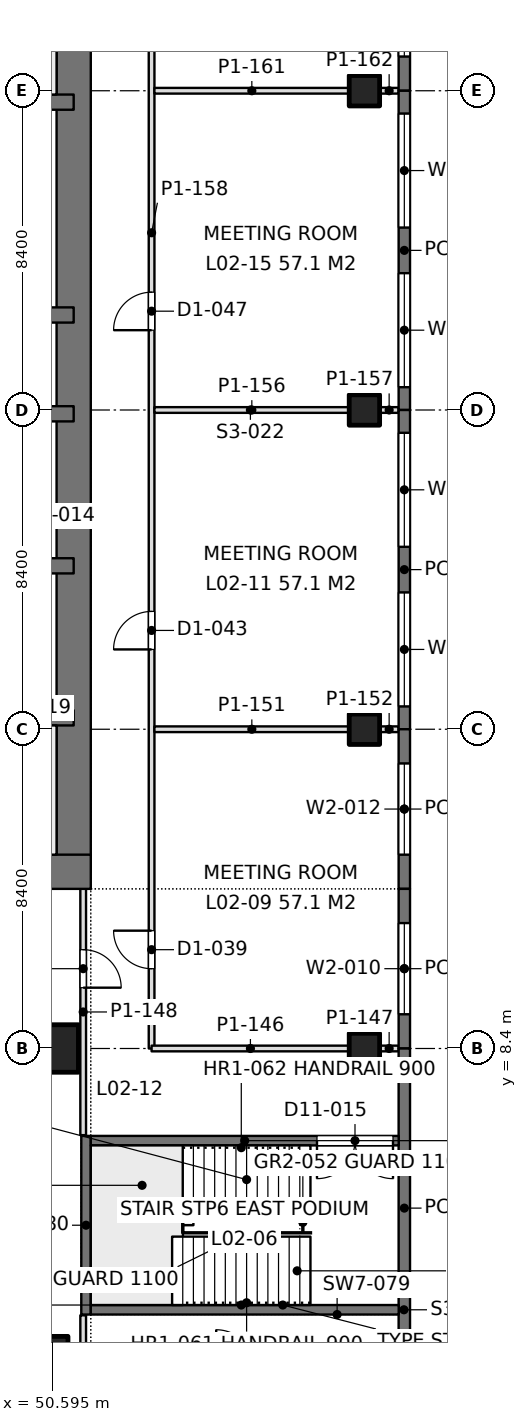
"""IFC4 building model, lengths in metres.
Left out: names, types, materials, properties, quantities, classifications, styles, units other than length and angle.
Written with IfcOpenShell. Run it as: python <this file> out.ifc"""

import sys

from ifc_helpers import new_model, si_unit, direction, frame, frame_2d, origin, origin_2d, place, context, subcontext, project, spatial, rectangle, extrude, element, fill, save


model = new_model("IFC4")
c1 = context("Model", 3, precision=1e-05, world=origin(), true_north=direction((0.0, 1.0)))
c2 = subcontext(c1, "Body", "Model", "MODEL_VIEW")
j1 = project(units=[si_unit("LENGTHUNIT", "METRE"), si_unit("PLANEANGLEUNIT", "RADIAN")], contexts=[c1])
p1 = place(None, origin())
s1 = spatial("IfcSite", under=j1, at=p1, CompositionType="ELEMENT")
p2 = place(p1, origin())
s2 = spatial("IfcBuilding", under=s1, at=p2, CompositionType="ELEMENT")
p3 = place(p2, frame((0.0, 0.0, 9.9)))
s3 = spatial("IfcBuildingStorey", under=s2, at=p3, CompositionType="ELEMENT", Elevation=9.9)
p4 = place(p3, frame((50.4, 0.0, 0.0), z_axis=(0.0, 0.0, 1.0), x_axis=(1.0, 0.0, 0.0)))
e1 = element("IfcColumn", 1, at=p4, inside=s3, PredefinedType="COLUMN", context=c2, shape_type="SweptSolid", body=[
    extrude(rectangle(XDim=1.2, YDim=1.65, at=origin_2d()), origin(), (0.0, 0.0, 1.0), 4.5),
])
p5 = place(p3, frame((50.4, 8.4, 0.0), z_axis=(0.0, 0.0, 1.0), x_axis=(0.0, 1.0, 0.0)))
e2 = element("IfcColumn", 2, at=p5, inside=s3, PredefinedType="COLUMN", context=c2, shape_type="SweptSolid", body=[
    extrude(rectangle(XDim=1.25, YDim=1.75, at=origin_2d()), origin(), (0.0, 0.0, 1.0), 4.5),
])
for number, where, z_axis, x_axis in (
    (3, (58.8, 8.4, 0.0), (0.0, 0.0, 1.0), (1.0, 0.0, 0.0)),
    (4, (58.8, 16.8, 0.0), (0.0, 0.0, 1.0), (1.0, 0.0, 0.0)),
    (5, (58.8, 25.2, 0.0), (0.0, 0.0, 1.0), (1.0, 0.0, 0.0)),
    (6, (58.8, 33.6, 0.0), (0.0, 0.0, 1.0), (1.0, 0.0, 0.0)),
):
    element("IfcColumn", number, at=place(p3, frame(where, z_axis=z_axis, x_axis=x_axis)), inside=s3, PredefinedType="COLUMN", context=c2, shape_type="SweptSolid", body=[
        extrude(rectangle(XDim=0.8, YDim=0.8, at=origin_2d()), origin(), (0.0, 0.0, 1.0), 4.5),
    ])
p6 = place(p3, frame((33.6, 13.05, 0.0), z_axis=(0.0, 0.0, 1.0), x_axis=(1.0, 0.0, 0.0)))
e7 = element("IfcWall", 7, at=p6, inside=s3, PredefinedType="SHEAR", context=c2, shape_type="SweptSolid", body=[
    extrude(rectangle(XDim=18.0, YDim=0.9, at=frame_2d((9.0, 0.0))), origin(), (0.0, 0.0, 1.0), 4.5),
])
p7 = place(p6, frame((7.25, 0.0, 0.0)))
e8 = element("IfcOpeningElement", 8, at=p7, cuts=e7, PredefinedType="OPENING", context=c2, shape_type="SweptSolid", body=[
    extrude(rectangle(XDim=1.8, YDim=2.4, at=frame_2d((0.9, 1.2))), frame((0.0, 0.46, 0.0), z_axis=(0.0, -1.0, 0.0), x_axis=(1.0, 0.0, 0.0)), (0.0, 0.0, 1.0), 0.92),
])
p8 = place(p3, frame((51.15, 13.05, 0.0), z_axis=(0.0, 0.0, 1.0), x_axis=(0.0, 1.0, 0.0)))
e9 = element("IfcWall", 9, at=p8, inside=s3, PredefinedType="SHEAR", context=c2, shape_type="SweptSolid", body=[
    extrude(rectangle(XDim=24.3, YDim=0.9, at=frame_2d((12.15, 0.0))), origin(), (0.0, 0.0, 1.0), 4.5),
])
for number, where, z_axis, x_axis in (
    (10, (51.15, 17.1, 0.0), (0.0, 0.0, 1.0), (-1.0, 0.0, 0.0)),
    (11, (51.15, 21.1, 0.0), (0.0, 0.0, 1.0), (-1.0, 0.0, 0.0)),
    (12, (51.15, 25.1, 0.0), (0.0, 0.0, 1.0), (-1.0, 0.0, 0.0)),
    (13, (51.15, 27.7, 0.0), (0.0, 0.0, 1.0), (-1.0, 0.0, 0.0)),
    (14, (51.15, 33.3, 0.0), (0.0, 0.0, 1.0), (-1.0, 0.0, 0.0)),
):
    element("IfcWall", number, at=place(p3, frame(where, z_axis=z_axis, x_axis=x_axis)), inside=s3, PredefinedType="SHEAR", context=c2, shape_type="SweptSolid", body=[
        extrude(rectangle(XDim=7.65, YDim=0.4, at=frame_2d((3.825, 0.0))), origin(), (0.0, 0.0, 1.0), 4.5),
    ])
p9 = place(p3, frame((59.85, 37.8, 0.0), z_axis=(0.0, 0.0, 1.0), x_axis=(0.0, -1.0, 0.0)))
e15 = element("IfcWall", 15, at=p9, inside=s3, PredefinedType="SOLIDWALL", context=c2, shape_type="SweptSolid", body=[
    extrude(rectangle(XDim=4.2, YDim=0.3, at=frame_2d((2.1, 0.0))), origin(), (0.0, 0.0, 1.0), 4.3),
])
p10 = place(p9, frame((0.9, 0.0, 0.9)))
e16 = element("IfcOpeningElement", 16, at=p10, cuts=e15, PredefinedType="OPENING", context=c2, shape_type="SweptSolid", body=[
    extrude(rectangle(XDim=2.4, YDim=1.9, at=frame_2d((1.2, 0.95))), frame((0.0, 0.16, 0.0), z_axis=(0.0, -1.0, 0.0), x_axis=(1.0, 0.0, 0.0)), (0.0, 0.0, 1.0), 0.32),
])
p11 = place(p3, frame((59.85, 33.6, 0.0), z_axis=(0.0, 0.0, 1.0), x_axis=(0.0, -1.0, 0.0)))
e17 = element("IfcWall", 17, at=p11, inside=s3, PredefinedType="SOLIDWALL", context=c2, shape_type="SweptSolid", body=[
    extrude(rectangle(XDim=8.4, YDim=0.3, at=frame_2d((4.2, 0.0))), origin(), (0.0, 0.0, 1.0), 4.3),
])
p12 = place(p11, frame((0.6, 0.0, 0.9)))
e18 = element("IfcOpeningElement", 18, at=p12, cuts=e17, PredefinedType="OPENING", context=c2, shape_type="SweptSolid", body=[
    extrude(rectangle(XDim=3.0, YDim=2.4, at=frame_2d((1.5, 1.2))), frame((0.0, 0.16, 0.0), z_axis=(0.0, -1.0, 0.0), x_axis=(1.0, 0.0, 0.0)), (0.0, 0.0, 1.0), 0.32),
])
p13 = place(p11, frame((4.8, 0.0, 0.9)))
e19 = element("IfcOpeningElement", 19, at=p13, cuts=e17, PredefinedType="OPENING", context=c2, shape_type="SweptSolid", body=[
    extrude(rectangle(XDim=3.0, YDim=2.4, at=frame_2d((1.5, 1.2))), frame((0.0, 0.16, 0.0), z_axis=(0.0, -1.0, 0.0), x_axis=(1.0, 0.0, 0.0)), (0.0, 0.0, 1.0), 0.32),
])
p14 = place(p3, frame((59.85, 25.2, 0.0), z_axis=(0.0, 0.0, 1.0), x_axis=(0.0, -1.0, 0.0)))
e20 = element("IfcWall", 20, at=p14, inside=s3, PredefinedType="SOLIDWALL", context=c2, shape_type="SweptSolid", body=[
    extrude(rectangle(XDim=8.4, YDim=0.3, at=frame_2d((4.2, 0.0))), origin(), (0.0, 0.0, 1.0), 4.3),
])
p15 = place(p14, frame((0.6, 0.0, 0.9)))
e21 = element("IfcOpeningElement", 21, at=p15, cuts=e20, PredefinedType="OPENING", context=c2, shape_type="SweptSolid", body=[
    extrude(rectangle(XDim=3.0, YDim=2.4, at=frame_2d((1.5, 1.2))), frame((0.0, 0.16, 0.0), z_axis=(0.0, -1.0, 0.0), x_axis=(1.0, 0.0, 0.0)), (0.0, 0.0, 1.0), 0.32),
])
p16 = place(p14, frame((4.8, 0.0, 0.9)))
e22 = element("IfcOpeningElement", 22, at=p16, cuts=e20, PredefinedType="OPENING", context=c2, shape_type="SweptSolid", body=[
    extrude(rectangle(XDim=3.0, YDim=2.4, at=frame_2d((1.5, 1.2))), frame((0.0, 0.16, 0.0), z_axis=(0.0, -1.0, 0.0), x_axis=(1.0, 0.0, 0.0)), (0.0, 0.0, 1.0), 0.32),
])
p17 = place(p3, frame((59.85, 16.8, 0.0), z_axis=(0.0, 0.0, 1.0), x_axis=(0.0, -1.0, 0.0)))
e23 = element("IfcWall", 23, at=p17, inside=s3, PredefinedType="SOLIDWALL", context=c2, shape_type="SweptSolid", body=[
    extrude(rectangle(XDim=4.2, YDim=0.3, at=frame_2d((2.1, 0.0))), origin(), (0.0, 0.0, 1.0), 4.3),
])
p18 = place(p17, frame((0.9, 0.0, 0.9)))
e24 = element("IfcOpeningElement", 24, at=p18, cuts=e23, PredefinedType="OPENING", context=c2, shape_type="SweptSolid", body=[
    extrude(rectangle(XDim=2.4, YDim=1.9, at=frame_2d((1.2, 0.95))), frame((0.0, 0.16, 0.0), z_axis=(0.0, -1.0, 0.0), x_axis=(1.0, 0.0, 0.0)), (0.0, 0.0, 1.0), 0.32),
])
p19 = place(p3, frame((59.85, 12.6, 0.0), z_axis=(0.0, 0.0, 1.0), x_axis=(0.0, -1.0, 0.0)))
e25 = element("IfcWall", 25, at=p19, inside=s3, PredefinedType="SOLIDWALL", context=c2, shape_type="SweptSolid", body=[
    extrude(rectangle(XDim=4.2, YDim=0.3, at=frame_2d((2.1, 0.0))), origin(), (0.0, 0.0, 1.0), 4.3),
])
p20 = place(p19, frame((0.9, 0.0, 0.9)))
e26 = element("IfcOpeningElement", 26, at=p20, cuts=e25, PredefinedType="OPENING", context=c2, shape_type="SweptSolid", body=[
    extrude(rectangle(XDim=2.4, YDim=1.9, at=frame_2d((1.2, 0.95))), frame((0.0, 0.16, 0.0), z_axis=(0.0, -1.0, 0.0), x_axis=(1.0, 0.0, 0.0)), (0.0, 0.0, 1.0), 0.32),
])
p21 = place(p3, frame((59.85, 8.4, 0.0), z_axis=(0.0, 0.0, 1.0), x_axis=(0.0, -1.0, 0.0)))
e27 = element("IfcWall", 27, at=p21, inside=s3, PredefinedType="SOLIDWALL", context=c2, shape_type="SweptSolid", body=[
    extrude(rectangle(XDim=8.4, YDim=0.3, at=frame_2d((4.2, 0.0))), origin(), (0.0, 0.0, 1.0), 4.3),
])
p22 = place(p3, frame((51.4, -1.0, 0.0), z_axis=(0.0, 0.0, 1.0), x_axis=(0.0, 1.0, 0.0)))
e28 = element("IfcWall", 28, at=p22, inside=s3, PredefinedType="PARTITIONING", context=c2, shape_type="SweptSolid", body=[
    extrude(rectangle(XDim=2.38, YDim=0.15, at=frame_2d((1.19, 0.0))), origin(), (0.0, 0.0, 1.0), 3.65),
])
p23 = place(p3, frame((51.4, 6.12, 0.0), z_axis=(0.0, 0.0, 1.0), x_axis=(0.0, 1.0, 0.0)))
e29 = element("IfcWall", 29, at=p23, inside=s3, PredefinedType="PARTITIONING", context=c2, shape_type="SweptSolid", body=[
    extrude(rectangle(XDim=6.482, YDim=0.15, at=frame_2d((3.241, 0.0))), origin(), (0.0, 0.0, 1.0), 3.65),
])
p24 = place(p23, frame((3.88, 0.0, 0.0)))
e30 = element("IfcOpeningElement", 30, at=p24, cuts=e29, PredefinedType="OPENING", context=c2, shape_type="SweptSolid", body=[
    extrude(rectangle(XDim=1.0, YDim=2.2, at=frame_2d((0.5, 1.1))), frame((0.0, 0.085, 0.0), z_axis=(0.0, -1.0, 0.0), x_axis=(1.0, 0.0, 0.0)), (0.0, 0.0, 1.0), 0.17),
])
p25 = place(p3, frame((53.2, 8.4, 0.0), z_axis=(0.0, 0.0, 1.0), x_axis=(0.0, 1.0, 0.0)))
e31 = element("IfcWall", 31, at=p25, inside=s3, PredefinedType="PARTITIONING", context=c2, shape_type="SweptSolid", body=[
    extrude(rectangle(XDim=42.926, YDim=0.15, at=frame_2d((21.463, 0.0))), origin(), (0.0, 0.0, 1.0), 3.65),
])
p26 = place(p25, frame((2.1, 0.0, 0.0)))
e32 = element("IfcOpeningElement", 32, at=p26, cuts=e31, PredefinedType="OPENING", context=c2, shape_type="SweptSolid", body=[
    extrude(rectangle(XDim=1.0, YDim=2.2, at=frame_2d((0.5, 1.1))), frame((0.0, 0.085, 0.0), z_axis=(0.0, -1.0, 0.0), x_axis=(1.0, 0.0, 0.0)), (0.0, 0.0, 1.0), 0.17),
])
p27 = place(p25, frame((10.5, 0.0, 0.0)))
e33 = element("IfcOpeningElement", 33, at=p27, cuts=e31, PredefinedType="OPENING", context=c2, shape_type="SweptSolid", body=[
    extrude(rectangle(XDim=1.0, YDim=2.2, at=frame_2d((0.5, 1.1))), frame((0.0, 0.085, 0.0), z_axis=(0.0, -1.0, 0.0), x_axis=(1.0, 0.0, 0.0)), (0.0, 0.0, 1.0), 0.17),
])
p28 = place(p25, frame((18.9, 0.0, 0.0)))
e34 = element("IfcOpeningElement", 34, at=p28, cuts=e31, PredefinedType="OPENING", context=c2, shape_type="SweptSolid", body=[
    extrude(rectangle(XDim=1.0, YDim=2.2, at=frame_2d((0.5, 1.1))), frame((0.0, 0.085, 0.0), z_axis=(0.0, -1.0, 0.0), x_axis=(1.0, 0.0, 0.0)), (0.0, 0.0, 1.0), 0.17),
])
p29 = place(p25, frame((27.3, 0.0, 0.0)))
e35 = element("IfcOpeningElement", 35, at=p29, cuts=e31, PredefinedType="OPENING", context=c2, shape_type="SweptSolid", body=[
    extrude(rectangle(XDim=1.0, YDim=2.2, at=frame_2d((0.5, 1.1))), frame((0.0, 0.085, 0.0), z_axis=(0.0, -1.0, 0.0), x_axis=(1.0, 0.0, 0.0)), (0.0, 0.0, 1.0), 0.17),
])
p30 = place(p25, frame((36.2, 0.0, 0.0)))
e36 = element("IfcOpeningElement", 36, at=p30, cuts=e31, PredefinedType="OPENING", context=c2, shape_type="SweptSolid", body=[
    extrude(rectangle(XDim=1.0, YDim=2.2, at=frame_2d((0.5, 1.1))), frame((0.0, 0.085, 0.0), z_axis=(0.0, -1.0, 0.0), x_axis=(1.0, 0.0, 0.0)), (0.0, 0.0, 1.0), 0.17),
])
p31 = place(p3, frame((53.2, 8.4, 0.0), z_axis=(0.0, 0.0, 1.0), x_axis=(1.0, 0.0, 0.0)))
e37 = element("IfcWall", 37, at=p31, inside=s3, PredefinedType="PARTITIONING", context=c2, shape_type="SweptSolid", body=[
    extrude(rectangle(XDim=5.201, YDim=0.15, at=frame_2d((2.601, 0.0))), origin(), (0.0, 0.0, 1.0), 3.65),
])
p32 = place(p3, frame((59.199, 8.4, 0.0), z_axis=(0.0, 0.0, 1.0), x_axis=(1.0, 0.0, 0.0)))
e38 = element("IfcWall", 38, at=p32, inside=s3, PredefinedType="PARTITIONING", context=c2, shape_type="SweptSolid", body=[
    extrude(rectangle(XDim=0.503, YDim=0.15, at=frame_2d((0.251, 0.0))), origin(), (0.0, 0.0, 1.0), 4.3),
])
p33 = place(p3, frame((53.274, 16.8, 0.0), z_axis=(0.0, 0.0, 1.0), x_axis=(1.0, 0.0, 0.0)))
e39 = element("IfcWall", 39, at=p33, inside=s3, PredefinedType="PARTITIONING", context=c2, shape_type="SweptSolid", body=[
    extrude(rectangle(XDim=5.127, YDim=0.15, at=frame_2d((2.563, 0.0))), origin(), (0.0, 0.0, 1.0), 3.65),
])
p34 = place(p3, frame((59.199, 16.8, 0.0), z_axis=(0.0, 0.0, 1.0), x_axis=(1.0, 0.0, 0.0)))
e40 = element("IfcWall", 40, at=p34, inside=s3, PredefinedType="PARTITIONING", context=c2, shape_type="SweptSolid", body=[
    extrude(rectangle(XDim=0.503, YDim=0.15, at=frame_2d((0.251, 0.0))), origin(), (0.0, 0.0, 1.0), 4.3),
])
p35 = place(p3, frame((53.274, 25.2, 0.0), z_axis=(0.0, 0.0, 1.0), x_axis=(1.0, 0.0, 0.0)))
e41 = element("IfcWall", 41, at=p35, inside=s3, PredefinedType="PARTITIONING", context=c2, shape_type="SweptSolid", body=[
    extrude(rectangle(XDim=5.127, YDim=0.15, at=frame_2d((2.563, 0.0))), origin(), (0.0, 0.0, 1.0), 3.65),
])
p36 = place(p3, frame((59.199, 25.2, 0.0), z_axis=(0.0, 0.0, 1.0), x_axis=(1.0, 0.0, 0.0)))
e42 = element("IfcWall", 42, at=p36, inside=s3, PredefinedType="PARTITIONING", context=c2, shape_type="SweptSolid", body=[
    extrude(rectangle(XDim=0.503, YDim=0.15, at=frame_2d((0.251, 0.0))), origin(), (0.0, 0.0, 1.0), 4.3),
])
p37 = place(p3, frame((53.274, 33.6, 0.0), z_axis=(0.0, 0.0, 1.0), x_axis=(1.0, 0.0, 0.0)))
e43 = element("IfcWall", 43, at=p37, inside=s3, PredefinedType="PARTITIONING", context=c2, shape_type="SweptSolid", body=[
    extrude(rectangle(XDim=5.127, YDim=0.15, at=frame_2d((2.563, 0.0))), origin(), (0.0, 0.0, 1.0), 3.65),
])
p38 = place(p3, frame((59.199, 33.6, 0.0), z_axis=(0.0, 0.0, 1.0), x_axis=(1.0, 0.0, 0.0)))
e44 = element("IfcWall", 44, at=p38, inside=s3, PredefinedType="PARTITIONING", context=c2, shape_type="SweptSolid", body=[
    extrude(rectangle(XDim=0.503, YDim=0.15, at=frame_2d((0.251, 0.0))), origin(), (0.0, 0.0, 1.0), 4.3),
])
p39 = place(p3, frame((59.702, 1.525, 0.0), z_axis=(0.0, 0.0, 1.0), x_axis=(-1.0, 0.0, 0.0)))
e45 = element("IfcWall", 45, at=p39, inside=s3, PredefinedType="SOLIDWALL", context=c2, shape_type="SweptSolid", body=[
    extrude(rectangle(XDim=8.102, YDim=0.25, at=frame_2d((4.051, 0.0))), origin(), (0.0, 0.0, 1.0), 4.5),
])
p40 = place(p3, frame((59.702, 5.975, 0.0), z_axis=(0.0, 0.0, 1.0), x_axis=(-1.0, 0.0, 0.0)))
e46 = element("IfcWall", 46, at=p40, inside=s3, PredefinedType="SOLIDWALL", context=c2, shape_type="SweptSolid", body=[
    extrude(rectangle(XDim=8.102, YDim=0.25, at=frame_2d((4.051, 0.0))), origin(), (0.0, 0.0, 1.0), 4.5),
])
p41 = place(p40, frame((0.15, 0.0, 0.0)))
e47 = element("IfcOpeningElement", 47, at=p41, cuts=e46, PredefinedType="OPENING", context=c2, shape_type="SweptSolid", body=[
    extrude(rectangle(XDim=2.0, YDim=2.2, at=frame_2d((1.0, 1.1))), frame((0.0, 0.135, 0.0), z_axis=(0.0, -1.0, 0.0), x_axis=(1.0, 0.0, 0.0)), (0.0, 0.0, 1.0), 0.27),
])
p42 = place(p3, frame((51.475, 1.4, 0.0), z_axis=(0.0, 0.0, 1.0), x_axis=(0.0, 1.0, 0.0)))
e48 = element("IfcWall", 48, at=p42, inside=s3, PredefinedType="SOLIDWALL", context=c2, shape_type="SweptSolid", body=[
    extrude(rectangle(XDim=4.7, YDim=0.25, at=frame_2d((2.35, 0.0))), origin(), (0.0, 0.0, 1.0), 4.5),
])
p43 = place(p10, origin())
e49 = element("IfcWindow", 49, at=p43, inside=s3, PartitioningType="SINGLE_PANEL", PredefinedType="WINDOW", context=c2, shape_type="SweptSolid", body=[
    extrude(rectangle(XDim=2.4, YDim=1.9, at=frame_2d((1.2, 0.95))), frame((0.0, 0.03, 0.0), z_axis=(0.0, -1.0, 0.0), x_axis=(1.0, 0.0, 0.0)), (0.0, 0.0, 1.0), 0.06),
])
fill(e16, e49)
p44 = place(p12, origin())
e50 = element("IfcWindow", 50, at=p44, inside=s3, PartitioningType="SINGLE_PANEL", PredefinedType="WINDOW", context=c2, shape_type="SweptSolid", body=[
    extrude(rectangle(XDim=3.0, YDim=2.4, at=frame_2d((1.5, 1.2))), frame((0.0, 0.03, 0.0), z_axis=(0.0, -1.0, 0.0), x_axis=(1.0, 0.0, 0.0)), (0.0, 0.0, 1.0), 0.06),
])
fill(e18, e50)
p45 = place(p13, origin())
e51 = element("IfcWindow", 51, at=p45, inside=s3, PartitioningType="SINGLE_PANEL", PredefinedType="WINDOW", context=c2, shape_type="SweptSolid", body=[
    extrude(rectangle(XDim=3.0, YDim=2.4, at=frame_2d((1.5, 1.2))), frame((0.0, 0.03, 0.0), z_axis=(0.0, -1.0, 0.0), x_axis=(1.0, 0.0, 0.0)), (0.0, 0.0, 1.0), 0.06),
])
fill(e19, e51)
p46 = place(p15, origin())
e52 = element("IfcWindow", 52, at=p46, inside=s3, PartitioningType="SINGLE_PANEL", PredefinedType="WINDOW", context=c2, shape_type="SweptSolid", body=[
    extrude(rectangle(XDim=3.0, YDim=2.4, at=frame_2d((1.5, 1.2))), frame((0.0, 0.03, 0.0), z_axis=(0.0, -1.0, 0.0), x_axis=(1.0, 0.0, 0.0)), (0.0, 0.0, 1.0), 0.06),
])
fill(e21, e52)
p47 = place(p16, origin())
e53 = element("IfcWindow", 53, at=p47, inside=s3, PartitioningType="SINGLE_PANEL", PredefinedType="WINDOW", context=c2, shape_type="SweptSolid", body=[
    extrude(rectangle(XDim=3.0, YDim=2.4, at=frame_2d((1.5, 1.2))), frame((0.0, 0.03, 0.0), z_axis=(0.0, -1.0, 0.0), x_axis=(1.0, 0.0, 0.0)), (0.0, 0.0, 1.0), 0.06),
])
fill(e22, e53)
p48 = place(p18, origin())
e54 = element("IfcWindow", 54, at=p48, inside=s3, PartitioningType="SINGLE_PANEL", PredefinedType="WINDOW", context=c2, shape_type="SweptSolid", body=[
    extrude(rectangle(XDim=2.4, YDim=1.9, at=frame_2d((1.2, 0.95))), frame((0.0, 0.03, 0.0), z_axis=(0.0, -1.0, 0.0), x_axis=(1.0, 0.0, 0.0)), (0.0, 0.0, 1.0), 0.06),
])
fill(e24, e54)
p49 = place(p20, origin())
e55 = element("IfcWindow", 55, at=p49, inside=s3, PartitioningType="SINGLE_PANEL", PredefinedType="WINDOW", context=c2, shape_type="SweptSolid", body=[
    extrude(rectangle(XDim=2.4, YDim=1.9, at=frame_2d((1.2, 0.95))), frame((0.0, 0.03, 0.0), z_axis=(0.0, -1.0, 0.0), x_axis=(1.0, 0.0, 0.0)), (0.0, 0.0, 1.0), 0.06),
])
fill(e26, e55)
p50 = place(p24, frame((1.0, 0.0, 0.0), z_axis=(0.0, 0.0, 1.0), x_axis=(-1.0, 0.0, 0.0)))
e56 = element("IfcDoor", 56, at=p50, inside=s3, OperationType="SINGLE_SWING_RIGHT", PredefinedType="DOOR", context=c2, shape_type="SweptSolid", body=[
    extrude(rectangle(XDim=1.0, YDim=2.2, at=frame_2d((0.5, 1.1))), frame((0.0, 0.025, 0.0), z_axis=(0.0, -1.0, 0.0), x_axis=(1.0, 0.0, 0.0)), (0.0, 0.0, 1.0), 0.05),
])
fill(e30, e56)
p51 = place(p26, origin())
e57 = element("IfcDoor", 57, at=p51, inside=s3, OperationType="SINGLE_SWING_RIGHT", PredefinedType="DOOR", context=c2, shape_type="SweptSolid", body=[
    extrude(rectangle(XDim=1.0, YDim=2.2, at=frame_2d((0.5, 1.1))), frame((0.0, 0.025, 0.0), z_axis=(0.0, -1.0, 0.0), x_axis=(1.0, 0.0, 0.0)), (0.0, 0.0, 1.0), 0.05),
])
fill(e32, e57)
p52 = place(p27, origin())
e58 = element("IfcDoor", 58, at=p52, inside=s3, OperationType="SINGLE_SWING_LEFT", PredefinedType="DOOR", context=c2, shape_type="SweptSolid", body=[
    extrude(rectangle(XDim=1.0, YDim=2.2, at=frame_2d((0.5, 1.1))), frame((0.0, 0.025, 0.0), z_axis=(0.0, -1.0, 0.0), x_axis=(1.0, 0.0, 0.0)), (0.0, 0.0, 1.0), 0.05),
])
fill(e33, e58)
p53 = place(p28, origin())
e59 = element("IfcDoor", 59, at=p53, inside=s3, OperationType="SINGLE_SWING_LEFT", PredefinedType="DOOR", context=c2, shape_type="SweptSolid", body=[
    extrude(rectangle(XDim=1.0, YDim=2.2, at=frame_2d((0.5, 1.1))), frame((0.0, 0.025, 0.0), z_axis=(0.0, -1.0, 0.0), x_axis=(1.0, 0.0, 0.0)), (0.0, 0.0, 1.0), 0.05),
])
fill(e34, e59)
p54 = place(p41, origin())
e60 = element("IfcDoor", 60, at=p54, inside=s3, OperationType="DOUBLE_DOOR_SINGLE_SWING", PredefinedType="DOOR", context=c2, shape_type="SweptSolid", body=[
    extrude(rectangle(XDim=2.0, YDim=2.2, at=frame_2d((1.0, 1.1))), frame((0.0, 0.025, 0.0), z_axis=(0.0, -1.0, 0.0), x_axis=(1.0, 0.0, 0.0)), (0.0, 0.0, 1.0), 0.05),
])
fill(e47, e60)
save(model, sys.argv[1])
